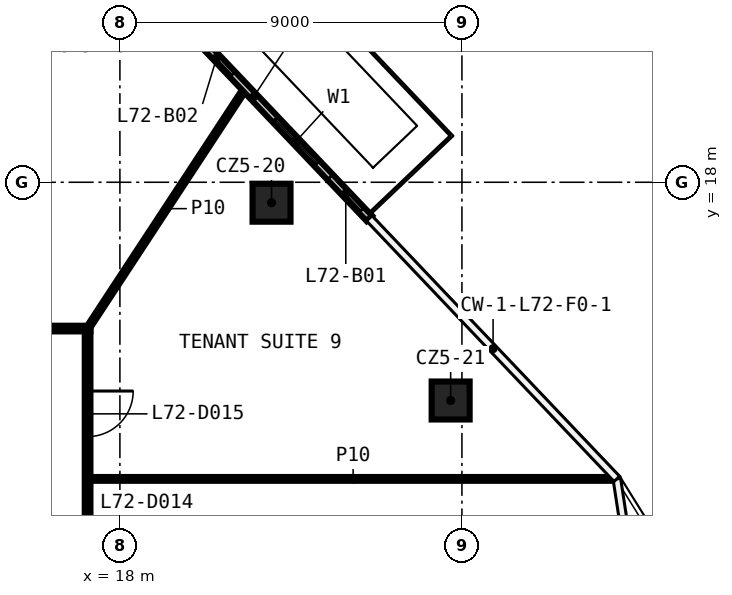
"""IFC4 building model, lengths in metres.
Left out: names, types, materials, properties, quantities, classifications, styles, units other than length and angle.
Written with IfcOpenShell. Run it as: python <this file> out.ifc"""

import sys

from ifc_helpers import new_model, si_unit, direction, frame, frame_2d, origin, origin_2d, place, context, subcontext, project, spatial, rectangle, extrude, element, fill, save


model = new_model("IFC4")
c1 = context("Model", 3, precision=1e-05, world=origin(), true_north=direction((0.0, 1.0)))
c2 = subcontext(c1, "Body", "Model", "MODEL_VIEW")
j1 = project(units=[si_unit("LENGTHUNIT", "METRE"), si_unit("PLANEANGLEUNIT", "RADIAN")], contexts=[c1])
p1 = place(None, origin())
s1 = spatial("IfcSite", under=j1, at=p1, CompositionType="ELEMENT")
p2 = place(p1, origin())
s2 = spatial("IfcBuilding", under=s1, at=p2, CompositionType="ELEMENT")
p3 = place(p2, frame((0.0, 0.0, 336.2)))
s3 = spatial("IfcBuildingStorey", under=s2, at=p3, CompositionType="ELEMENT", Elevation=336.2)
for number, where, z_axis, x_axis in (
    (1, (21.99, 17.462, 0.0), (0.0, 0.0, 1.0), (1.0, 0.0, 0.0)),
    (2, (26.703, 12.257, 0.0), (0.0, 0.0, 1.0), (1.0, 0.0, 0.0)),
):
    element("IfcColumn", number, at=place(p3, frame(where, z_axis=z_axis, x_axis=x_axis)), inside=s3, PredefinedType="COLUMN", context=c2, shape_type="SweptSolid", body=[
        extrude(rectangle(XDim=1.0, YDim=1.0, at=origin_2d()), origin(), (0.0, 0.0, 1.0), 3.82),
    ])
p4 = place(p3, frame((17.225, 10.194, 0.0), z_axis=(0.0, 0.0, 1.0), x_axis=(1.0, 0.0, 0.0)))
e3 = element("IfcWall", 3, at=p4, inside=s3, PredefinedType="PARTITIONING", context=c2, shape_type="SweptSolid", body=[
    extrude(rectangle(XDim=13.823, YDim=0.1, at=frame_2d((6.912, 0.0))), origin(), (0.0, 0.0, 1.0), 3.82),
])
p5 = place(p3, frame((-17.225, 14.15, 0.0), z_axis=(0.0, 0.0, 1.0), x_axis=(1.0, 0.0, 0.0)))
e4 = element("IfcWall", 4, at=p5, inside=s3, PredefinedType="PARTITIONING", context=c2, shape_type="SweptSolid", body=[
    extrude(rectangle(XDim=34.45, YDim=0.15, at=frame_2d((17.225, 0.0))), origin(), (0.0, 0.0, 1.0), 3.82),
])
p6 = place(p5, frame((24.708, 0.0, 0.0)))
e5 = element("IfcOpeningElement", 5, at=p6, cuts=e4, PredefinedType="OPENING", context=c2, shape_type="SweptSolid", body=[
    extrude(rectangle(XDim=1.2, YDim=2.1, at=frame_2d((0.6, 1.05))), frame((0.0, 0.085, 0.0), z_axis=(0.0, -1.0, 0.0), x_axis=(1.0, 0.0, 0.0)), (0.0, 0.0, 1.0), 0.17),
])
p7 = place(p5, frame((20.038, 0.0, 0.0)))
e6 = element("IfcOpeningElement", 6, at=p7, cuts=e4, PredefinedType="OPENING", context=c2, shape_type="SweptSolid", body=[
    extrude(rectangle(XDim=1.2, YDim=2.1, at=frame_2d((0.6, 1.05))), frame((0.0, 0.085, 0.0), z_axis=(0.0, -1.0, 0.0), x_axis=(1.0, 0.0, 0.0)), (0.0, 0.0, 1.0), 0.17),
])
p8 = place(p5, frame((15.367, 0.0, 0.0)))
e7 = element("IfcOpeningElement", 7, at=p8, cuts=e4, PredefinedType="OPENING", context=c2, shape_type="SweptSolid", body=[
    extrude(rectangle(XDim=1.2, YDim=2.1, at=frame_2d((0.6, 1.05))), frame((0.0, 0.085, 0.0), z_axis=(0.0, -1.0, 0.0), x_axis=(1.0, 0.0, 0.0)), (0.0, 0.0, 1.0), 0.17),
])
p9 = place(p5, frame((10.695, 0.0, 0.0)))
e8 = element("IfcOpeningElement", 8, at=p9, cuts=e4, PredefinedType="OPENING", context=c2, shape_type="SweptSolid", body=[
    extrude(rectangle(XDim=1.2, YDim=2.1, at=frame_2d((0.6, 1.05))), frame((0.0, 0.085, 0.0), z_axis=(0.0, -1.0, 0.0), x_axis=(1.0, 0.0, 0.0)), (0.0, 0.0, 1.0), 0.17),
])
p10 = place(p5, frame((6.025, 0.0, 0.0)))
e9 = element("IfcOpeningElement", 9, at=p10, cuts=e4, PredefinedType="OPENING", context=c2, shape_type="SweptSolid", body=[
    extrude(rectangle(XDim=1.2, YDim=2.1, at=frame_2d((0.6, 1.05))), frame((0.0, 0.085, 0.0), z_axis=(0.0, -1.0, 0.0), x_axis=(1.0, 0.0, 0.0)), (0.0, 0.0, 1.0), 0.17),
])
p11 = place(p5, frame((1.698, 0.0, 0.0)))
e10 = element("IfcOpeningElement", 10, at=p11, cuts=e4, PredefinedType="OPENING", context=c2, shape_type="SweptSolid", body=[
    extrude(rectangle(XDim=1.2, YDim=2.1, at=frame_2d((0.6, 1.05))), frame((0.0, 0.085, 0.0), z_axis=(0.0, -1.0, 0.0), x_axis=(1.0, 0.0, 0.0)), (0.0, 0.0, 1.0), 0.17),
])
p12 = place(p3, frame((17.15, 14.15, 0.0), z_axis=(0.0, 0.0, 1.0), x_axis=(0.548731307267, 0.835998775373, 0.0)))
e11 = element("IfcWall", 11, at=p12, inside=s3, PredefinedType="PARTITIONING", context=c2, shape_type="SweptSolid", body=[
    extrude(rectangle(XDim=7.55, YDim=0.1, at=frame_2d((3.775, 0.0))), origin(), (0.0, 0.0, 1.0), 3.82),
])
p13 = place(p3, frame((17.15, 14.075, 0.0), z_axis=(0.0, 0.0, 1.0), x_axis=(0.0, -1.0, 0.0)))
e12 = element("IfcWall", 12, at=p13, inside=s3, PredefinedType="PARTITIONING", context=c2, shape_type="SweptSolid", body=[
    extrude(rectangle(XDim=28.15, YDim=0.15, at=frame_2d((14.075, 0.0))), origin(), (0.0, 0.0, 1.0), 3.82),
])
p14 = place(p13, frame((24.339, 0.0, 0.0)))
e13 = element("IfcOpeningElement", 13, at=p14, cuts=e12, PredefinedType="OPENING", context=c2, shape_type="SweptSolid", body=[
    extrude(rectangle(XDim=1.2, YDim=2.1, at=frame_2d((0.6, 1.05))), frame((0.0, 0.085, 0.0), z_axis=(0.0, -1.0, 0.0), x_axis=(1.0, 0.0, 0.0)), (0.0, 0.0, 1.0), 0.17),
])
p15 = place(p13, frame((20.227, 0.0, 0.0)))
e14 = element("IfcOpeningElement", 14, at=p15, cuts=e12, PredefinedType="OPENING", context=c2, shape_type="SweptSolid", body=[
    extrude(rectangle(XDim=1.2, YDim=2.1, at=frame_2d((0.6, 1.05))), frame((0.0, 0.085, 0.0), z_axis=(0.0, -1.0, 0.0), x_axis=(1.0, 0.0, 0.0)), (0.0, 0.0, 1.0), 0.17),
])
p16 = place(p13, frame((16.115, 0.0, 0.0)))
e15 = element("IfcOpeningElement", 15, at=p16, cuts=e12, PredefinedType="OPENING", context=c2, shape_type="SweptSolid", body=[
    extrude(rectangle(XDim=1.2, YDim=2.1, at=frame_2d((0.6, 1.05))), frame((0.0, 0.085, 0.0), z_axis=(0.0, -1.0, 0.0), x_axis=(1.0, 0.0, 0.0)), (0.0, 0.0, 1.0), 0.17),
])
p17 = place(p13, frame((12.006, 0.0, 0.0)))
e16 = element("IfcOpeningElement", 16, at=p17, cuts=e12, PredefinedType="OPENING", context=c2, shape_type="SweptSolid", body=[
    extrude(rectangle(XDim=1.2, YDim=2.1, at=frame_2d((0.6, 1.05))), frame((0.0, 0.085, 0.0), z_axis=(0.0, -1.0, 0.0), x_axis=(1.0, 0.0, 0.0)), (0.0, 0.0, 1.0), 0.17),
])
p18 = place(p13, frame((5.464, 0.0, 0.0)))
e17 = element("IfcOpeningElement", 17, at=p18, cuts=e12, PredefinedType="OPENING", context=c2, shape_type="SweptSolid", body=[
    extrude(rectangle(XDim=1.2, YDim=2.1, at=frame_2d((0.6, 1.05))), frame((0.0, 0.085, 0.0), z_axis=(0.0, -1.0, 0.0), x_axis=(1.0, 0.0, 0.0)), (0.0, 0.0, 1.0), 0.17),
])
p19 = place(p13, frame((1.569, 0.0, 0.0)))
e18 = element("IfcOpeningElement", 18, at=p19, cuts=e12, PredefinedType="OPENING", context=c2, shape_type="SweptSolid", body=[
    extrude(rectangle(XDim=1.2, YDim=2.1, at=frame_2d((0.6, 1.05))), frame((0.0, 0.085, 0.0), z_axis=(0.0, -1.0, 0.0), x_axis=(1.0, 0.0, 0.0)), (0.0, 0.0, 1.0), 0.17),
])
p20 = place(p3, frame((24.563, 17.049, 0.0), z_axis=(0.0, 0.0, 1.0), x_axis=(-0.688807081371, 0.724944690755, 0.0)))
e19 = element("IfcWall", 19, at=p20, inside=s3, PredefinedType="SOLIDWALL", context=c2, shape_type="SweptSolid", body=[
    extrude(rectangle(XDim=9.465, YDim=0.2, at=frame_2d((4.732, 0.0))), origin(), (0.0, 0.0, 1.0), 3.82),
])
p21 = place(p20, frame((2.0, 0.0, 0.6)))
e20 = element("IfcOpeningElement", 20, at=p21, cuts=e19, PredefinedType="OPENING", context=c2, shape_type="SweptSolid", body=[
    extrude(rectangle(XDim=1.6, YDim=2.4, at=frame_2d((0.8, 1.2))), frame((0.0, 0.11, 0.0), z_axis=(0.0, -1.0, 0.0), x_axis=(1.0, 0.0, 0.0)), (0.0, 0.0, 1.0), 0.22),
])
p22 = place(p20, frame((0.3, 0.0, 0.0)))
e21 = element("IfcOpeningElement", 21, at=p22, cuts=e19, PredefinedType="OPENING", context=c2, shape_type="SweptSolid", body=[
    extrude(rectangle(XDim=1.2, YDim=2.4, at=frame_2d((0.6, 1.2))), frame((0.0, 0.11, 0.0), z_axis=(0.0, -1.0, 0.0), x_axis=(1.0, 0.0, 0.0)), (0.0, 0.0, 1.0), 0.22),
])
p23 = place(p20, frame((6.733, 0.0, 0.6)))
e22 = element("IfcOpeningElement", 22, at=p23, cuts=e19, PredefinedType="OPENING", context=c2, shape_type="SweptSolid", body=[
    extrude(rectangle(XDim=1.6, YDim=2.4, at=frame_2d((0.8, 1.2))), frame((0.0, 0.11, 0.0), z_axis=(0.0, -1.0, 0.0), x_axis=(1.0, 0.0, 0.0)), (0.0, 0.0, 1.0), 0.22),
])
p24 = place(p20, frame((5.233, 0.0, 0.0)))
e23 = element("IfcOpeningElement", 23, at=p24, cuts=e19, PredefinedType="OPENING", context=c2, shape_type="SweptSolid", body=[
    extrude(rectangle(XDim=1.2, YDim=2.4, at=frame_2d((0.6, 1.2))), frame((0.0, 0.11, 0.0), z_axis=(0.0, -1.0, 0.0), x_axis=(1.0, 0.0, 0.0)), (0.0, 0.0, 1.0), 0.22),
])
p25 = place(p19, origin())
e24 = element("IfcDoor", 24, at=p25, inside=s3, OperationType="SINGLE_SWING_RIGHT", PredefinedType="DOOR", context=c2, shape_type="SweptSolid", body=[
    extrude(rectangle(XDim=1.2, YDim=2.1, at=frame_2d((0.6, 1.05))), frame((0.0, 0.025, 0.0), z_axis=(0.0, -1.0, 0.0), x_axis=(1.0, 0.0, 0.0)), (0.0, 0.0, 1.0), 0.05),
])
fill(e18, e24)
p26 = place(p21, origin())
e25 = element("IfcWindow", 25, at=p26, inside=s3, PartitioningType="SINGLE_PANEL", PredefinedType="WINDOW", context=c2, shape_type="SweptSolid", body=[
    extrude(rectangle(XDim=1.6, YDim=2.4, at=frame_2d((0.8, 1.2))), frame((0.0, 0.03, 0.0), z_axis=(0.0, -1.0, 0.0), x_axis=(1.0, 0.0, 0.0)), (0.0, 0.0, 1.0), 0.06),
])
fill(e20, e25)
p27 = place(p22, origin())
e26 = element("IfcDoor", 26, at=p27, inside=s3, OperationType="SLIDING_TO_LEFT", PredefinedType="DOOR", context=c2, shape_type="SweptSolid", body=[
    extrude(rectangle(XDim=1.2, YDim=2.4, at=frame_2d((0.6, 1.2))), frame((0.0, 0.025, 0.0), z_axis=(0.0, -1.0, 0.0), x_axis=(1.0, 0.0, 0.0)), (0.0, 0.0, 1.0), 0.05),
])
fill(e21, e26)
p28 = place(p24, origin())
e27 = element("IfcDoor", 27, at=p28, inside=s3, OperationType="SLIDING_TO_LEFT", PredefinedType="DOOR", context=c2, shape_type="SweptSolid", body=[
    extrude(rectangle(XDim=1.2, YDim=2.4, at=frame_2d((0.6, 1.2))), frame((0.0, 0.025, 0.0), z_axis=(0.0, -1.0, 0.0), x_axis=(1.0, 0.0, 0.0)), (0.0, 0.0, 1.0), 0.05),
])
fill(e23, e27)
save(model, sys.argv[1])
